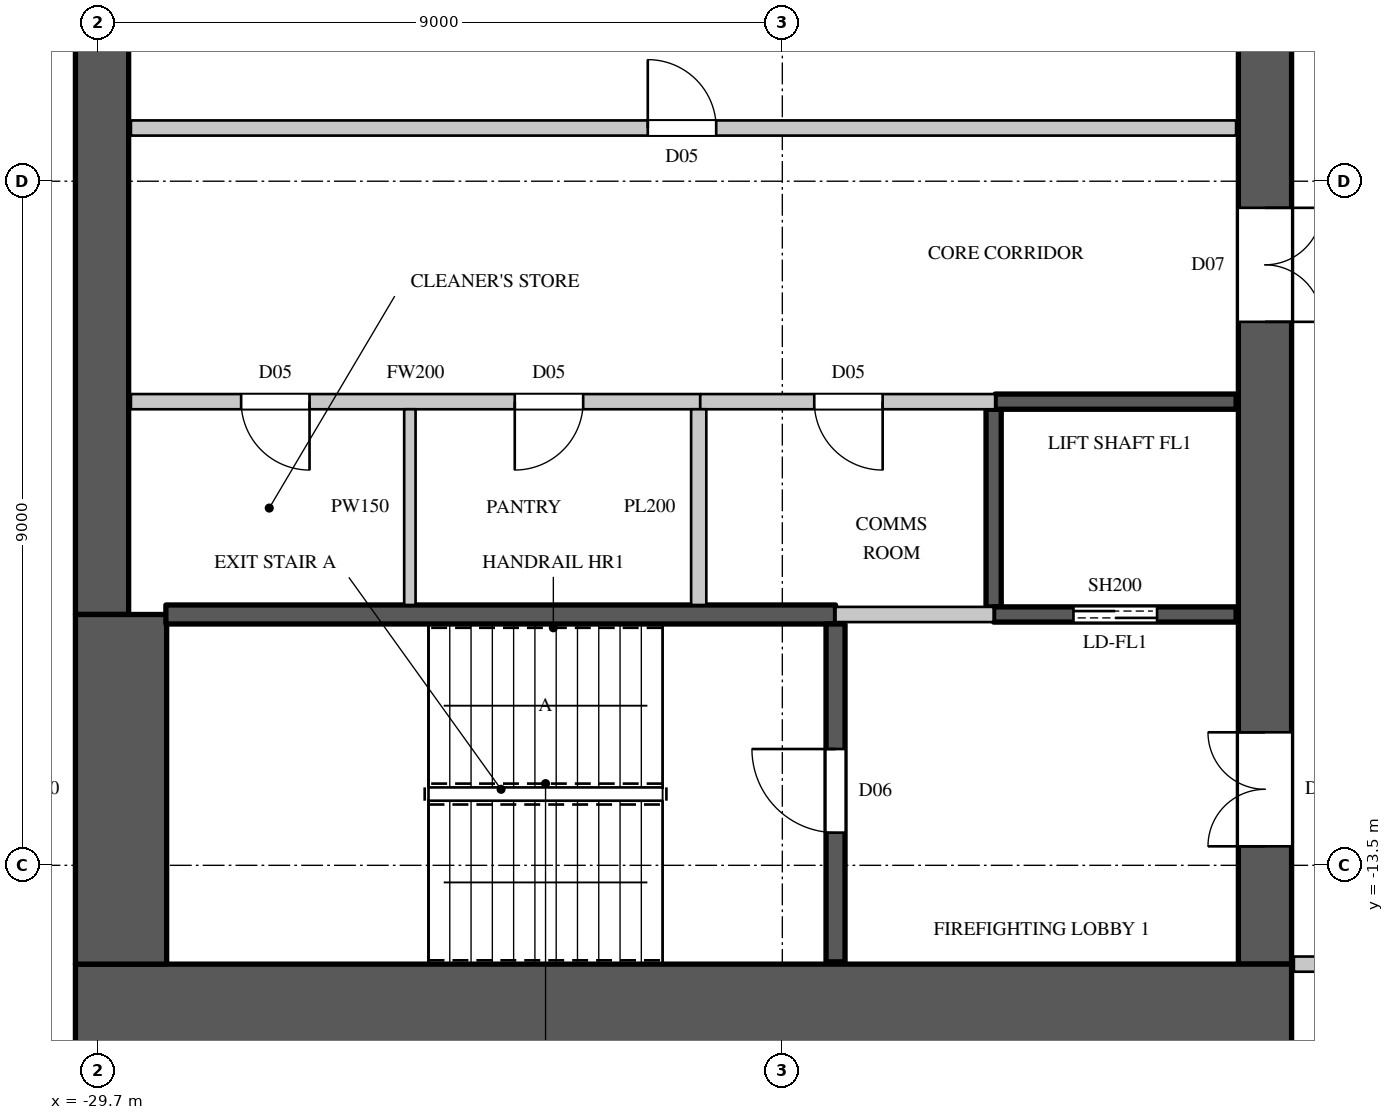
"""IFC4 building model, lengths in metres.
Left out: names, types, materials, properties, quantities, classifications, styles, units other than length and angle.
Written with IfcOpenShell. Run it as: python <this file> out.ifc"""

import sys

from ifc_helpers import new_model, si_unit, direction, frame, frame_2d, origin, place, context, subcontext, project, spatial, rectangle, extrude, element, fill, save


model = new_model("IFC4")
c1 = context("Model", 3, precision=1e-05, world=origin(), true_north=direction((0.0, 1.0)))
c2 = subcontext(c1, "Body", "Model", "MODEL_VIEW")
j1 = project(units=[si_unit("LENGTHUNIT", "METRE"), si_unit("PLANEANGLEUNIT", "RADIAN")], contexts=[c1])
p1 = place(None, origin())
s1 = spatial("IfcSite", under=j1, at=p1, CompositionType="ELEMENT")
p2 = place(p1, origin())
s2 = spatial("IfcBuilding", under=s1, at=p2, CompositionType="ELEMENT")
p3 = place(p2, frame((0.0, 0.0, 313.1)))
s3 = spatial("IfcBuildingStorey", under=s2, at=p3, CompositionType="ELEMENT", Elevation=313.1)
p4 = place(p3, frame((-30.0, -15.4, 0.0), z_axis=(0.0, 0.0, 1.0), x_axis=(1.0, 0.0, 0.0)))
e1 = element("IfcWall", 1, at=p4, inside=s3, PredefinedType="SHEAR", context=c2, shape_type="SweptSolid", body=[
    extrude(rectangle(XDim=16.0, YDim=1.2, at=frame_2d((8.0, 0.0))), origin(), (0.0, 0.0, 1.0), 4.1),
])
p5 = place(p3, frame((-14.35, -14.8, 0.0), z_axis=(0.0, 0.0, 1.0), x_axis=(0.0, 1.0, 0.0)))
e2 = element("IfcWall", 2, at=p5, inside=s3, PredefinedType="SHEAR", context=c2, shape_type="SweptSolid", body=[
    extrude(rectangle(XDim=29.6, YDim=0.7, at=frame_2d((14.8, 0.0))), origin(), (0.0, 0.0, 1.0), 4.1),
])
p6 = place(p5, frame((1.55, 0.0, 0.0)))
e3 = element("IfcOpeningElement", 3, at=p6, cuts=e2, PredefinedType="OPENING", context=c2, shape_type="SweptSolid", body=[
    extrude(rectangle(XDim=1.5, YDim=2.4, at=frame_2d((0.75, 1.2))), frame((0.0, 0.36, 0.0), z_axis=(0.0, -1.0, 0.0), x_axis=(1.0, 0.0, 0.0)), (0.0, 0.0, 1.0), 0.72),
])
p7 = place(p5, frame((26.55, 0.0, 0.0)))
e4 = element("IfcOpeningElement", 4, at=p7, cuts=e2, PredefinedType="OPENING", context=c2, shape_type="SweptSolid", body=[
    extrude(rectangle(XDim=1.5, YDim=2.4, at=frame_2d((0.75, 1.2))), frame((0.0, 0.36, 0.0), z_axis=(0.0, -1.0, 0.0), x_axis=(1.0, 0.0, 0.0)), (0.0, 0.0, 1.0), 0.72),
])
p8 = place(p5, frame((8.45, 0.0, 0.0)))
e5 = element("IfcOpeningElement", 5, at=p8, cuts=e2, PredefinedType="OPENING", context=c2, shape_type="SweptSolid", body=[
    extrude(rectangle(XDim=1.5, YDim=2.4, at=frame_2d((0.75, 1.2))), frame((0.0, 0.36, 0.0), z_axis=(0.0, -1.0, 0.0), x_axis=(1.0, 0.0, 0.0)), (0.0, 0.0, 1.0), 0.72),
])
p9 = place(p5, frame((19.65, 0.0, 0.0)))
e6 = element("IfcOpeningElement", 6, at=p9, cuts=e2, PredefinedType="OPENING", context=c2, shape_type="SweptSolid", body=[
    extrude(rectangle(XDim=1.5, YDim=2.4, at=frame_2d((0.75, 1.2))), frame((0.0, 0.36, 0.0), z_axis=(0.0, -1.0, 0.0), x_axis=(1.0, 0.0, 0.0)), (0.0, 0.0, 1.0), 0.72),
])
p10 = place(p5, frame((14.5, 0.0, 0.0)))
e7 = element("IfcOpeningElement", 7, at=p10, cuts=e2, PredefinedType="OPENING", context=c2, shape_type="SweptSolid", body=[
    extrude(rectangle(XDim=0.6, YDim=2.0, at=frame_2d((0.3, 1.0))), frame((0.0, 0.36, 0.0), z_axis=(0.0, -1.0, 0.0), x_axis=(1.0, 0.0, 0.0)), (0.0, 0.0, 1.0), 0.72),
])
p11 = place(p3, frame((-29.65, -10.2, 0.0), z_axis=(0.0, 0.0, 1.0), x_axis=(0.0, 1.0, 0.0)))
e8 = element("IfcWall", 8, at=p11, inside=s3, PredefinedType="SHEAR", context=c2, shape_type="SweptSolid", body=[
    extrude(rectangle(XDim=20.4, YDim=0.7, at=frame_2d((10.2, 0.0))), origin(), (0.0, 0.0, 1.0), 4.1),
])
p12 = place(p3, frame((-29.4, -14.8, 0.0), z_axis=(0.0, 0.0, 1.0), x_axis=(0.0, 1.0, 0.0)))
e9 = element("IfcWall", 9, at=p12, inside=s3, PredefinedType="SHEAR", context=c2, shape_type="SweptSolid", body=[
    extrude(rectangle(XDim=4.6, YDim=1.2, at=frame_2d((2.3, 0.0))), origin(), (0.0, 0.0, 1.0), 4.1),
])
p13 = place(p3, frame((-29.27, -7.4, 0.0), z_axis=(0.0, 0.0, 1.0), x_axis=(1.0, 0.0, 0.0)))
e10 = element("IfcWall", 10, at=p13, inside=s3, PredefinedType="PARTITIONING", context=c2, shape_type="SweptSolid", body=[
    extrude(rectangle(XDim=7.49, YDim=0.2, at=frame_2d((3.745, 0.0))), origin(), (0.0, 0.0, 1.0), 3.8),
])
p14 = place(p13, frame((1.45, 0.0, 0.0)))
e11 = element("IfcOpeningElement", 11, at=p14, cuts=e10, PredefinedType="OPENING", context=c2, shape_type="SweptSolid", body=[
    extrude(rectangle(XDim=0.9, YDim=2.2, at=frame_2d((0.45, 1.1))), frame((0.0, 0.11, 0.0), z_axis=(0.0, -1.0, 0.0), x_axis=(1.0, 0.0, 0.0)), (0.0, 0.0, 1.0), 0.22),
])
p15 = place(p13, frame((5.05, 0.0, 0.0)))
e12 = element("IfcOpeningElement", 12, at=p15, cuts=e10, PredefinedType="OPENING", context=c2, shape_type="SweptSolid", body=[
    extrude(rectangle(XDim=0.9, YDim=2.2, at=frame_2d((0.45, 1.1))), frame((0.0, 0.11, 0.0), z_axis=(0.0, -1.0, 0.0), x_axis=(1.0, 0.0, 0.0)), (0.0, 0.0, 1.0), 0.22),
])
p16 = place(p3, frame((-29.27, -3.8, 0.0), z_axis=(0.0, 0.0, 1.0), x_axis=(1.0, 0.0, 0.0)))
e13 = element("IfcWall", 13, at=p16, inside=s3, PredefinedType="PARTITIONING", context=c2, shape_type="SweptSolid", body=[
    extrude(rectangle(XDim=14.54, YDim=0.2, at=frame_2d((7.27, 0.0))), origin(), (0.0, 0.0, 1.0), 3.8),
])
p17 = place(p16, frame((6.8, 0.0, 0.0)))
e14 = element("IfcOpeningElement", 14, at=p17, cuts=e13, PredefinedType="OPENING", context=c2, shape_type="SweptSolid", body=[
    extrude(rectangle(XDim=0.9, YDim=2.2, at=frame_2d((0.45, 1.1))), frame((0.0, 0.11, 0.0), z_axis=(0.0, -1.0, 0.0), x_axis=(1.0, 0.0, 0.0)), (0.0, 0.0, 1.0), 0.22),
])
p18 = place(p3, frame((-13.97, -14.8, 0.0), z_axis=(0.0, 0.0, 1.0), x_axis=(1.0, 0.0, 0.0)))
e15 = element("IfcWall", 15, at=p18, inside=s3, PredefinedType="PARTITIONING", context=c2, shape_type="SweptSolid", body=[
    extrude(rectangle(XDim=2.87, YDim=0.2, at=frame_2d((1.435, 0.0))), origin(), (0.0, 0.0, 1.0), 3.8),
])
p19 = place(p3, frame((-25.6, -10.075, 0.0), z_axis=(0.0, 0.0, 1.0), x_axis=(0.0, 1.0, 0.0)))
e16 = element("IfcWall", 16, at=p19, inside=s3, PredefinedType="PARTITIONING", context=c2, shape_type="SweptSolid", body=[
    extrude(rectangle(XDim=2.575, YDim=0.15, at=frame_2d((1.288, 0.0))), origin(), (0.0, 0.0, 1.0), 3.8),
])
p20 = place(p3, frame((-21.78, -7.4, 0.0), z_axis=(0.0, 0.0, 1.0), x_axis=(1.0, 0.0, 0.0)))
e17 = element("IfcWall", 17, at=p20, inside=s3, PredefinedType="PARTITIONING", context=c2, shape_type="SweptSolid", body=[
    extrude(rectangle(XDim=3.88, YDim=0.2, at=frame_2d((1.94, 0.0))), origin(), (0.0, 0.0, 1.0), 3.8),
])
p21 = place(p20, frame((1.5, 0.0, 0.0)))
e18 = element("IfcOpeningElement", 18, at=p21, cuts=e17, PredefinedType="OPENING", context=c2, shape_type="SweptSolid", body=[
    extrude(rectangle(XDim=0.9, YDim=2.2, at=frame_2d((0.45, 1.1))), frame((0.0, 0.11, 0.0), z_axis=(0.0, -1.0, 0.0), x_axis=(1.0, 0.0, 0.0)), (0.0, 0.0, 1.0), 0.22),
])
p22 = place(p3, frame((-21.8, -10.075, 0.0), z_axis=(0.0, 0.0, 1.0), x_axis=(0.0, 1.0, 0.0)))
e19 = element("IfcWall", 19, at=p22, inside=s3, PredefinedType="PARTITIONING", context=c2, shape_type="SweptSolid", body=[
    extrude(rectangle(XDim=2.575, YDim=0.2, at=frame_2d((1.288, 0.0))), origin(), (0.0, 0.0, 1.0), 3.8),
])
p23 = place(p3, frame((-20.0, -10.2, 0.0), z_axis=(0.0, 0.0, 1.0), x_axis=(1.0, 0.0, 0.0)))
e20 = element("IfcWall", 20, at=p23, inside=s3, PredefinedType="PARTITIONING", context=c2, shape_type="SweptSolid", body=[
    extrude(rectangle(XDim=2.08, YDim=0.2, at=frame_2d((1.04, 0.0))), origin(), (0.0, 0.0, 1.0), 3.8),
])
p24 = place(p3, frame((-17.92, -10.1, 0.0), z_axis=(0.0, 0.0, 1.0), x_axis=(0.0, 1.0, 0.0)))
e21 = element("IfcWall", 21, at=p24, inside=s3, PredefinedType="SHEAR", context=c2, shape_type="SweptSolid", body=[
    extrude(rectangle(XDim=2.6, YDim=0.2, at=frame_2d((1.3, 0.0))), origin(), (0.0, 0.0, 1.0), 3.8),
])
p25 = place(p3, frame((-17.92, -10.2, 0.0), z_axis=(0.0, 0.0, 1.0), x_axis=(1.0, 0.0, 0.0)))
e22 = element("IfcWall", 22, at=p25, inside=s3, PredefinedType="SHEAR", context=c2, shape_type="SweptSolid", body=[
    extrude(rectangle(XDim=3.19, YDim=0.2, at=frame_2d((1.595, 0.0))), origin(), (0.0, 0.0, 1.0), 3.8),
])
p26 = place(p25, frame((1.05, 0.0, 0.0)))
e23 = element("IfcOpeningElement", 23, at=p26, cuts=e22, PredefinedType="OPENING", context=c2, shape_type="SweptSolid", body=[
    extrude(rectangle(XDim=1.1, YDim=2.2, at=frame_2d((0.55, 1.1))), frame((0.0, 0.11, 0.0), z_axis=(0.0, -1.0, 0.0), x_axis=(1.0, 0.0, 0.0)), (0.0, 0.0, 1.0), 0.22),
])
p27 = place(p3, frame((-17.9, -7.4, 0.0), z_axis=(0.0, 0.0, 1.0), x_axis=(1.0, 0.0, 0.0)))
e24 = element("IfcWall", 24, at=p27, inside=s3, PredefinedType="SHEAR", context=c2, shape_type="SweptSolid", body=[
    extrude(rectangle(XDim=3.17, YDim=0.2, at=frame_2d((1.585, 0.0))), origin(), (0.0, 0.0, 1.0), 3.8),
])
p28 = place(p3, frame((-28.81, -10.2, 0.0), z_axis=(0.0, 0.0, 1.0), x_axis=(1.0, 0.0, 0.0)))
e25 = element("IfcWall", 25, at=p28, inside=s3, PredefinedType="SHEAR", context=c2, shape_type="SweptSolid", body=[
    extrude(rectangle(XDim=8.81, YDim=0.25, at=frame_2d((4.405, 0.0))), origin(), (0.0, 0.0, 1.0), 3.8),
])
p29 = place(p3, frame((-20.0, -14.77, 0.0), z_axis=(0.0, 0.0, 1.0), x_axis=(0.0, 1.0, 0.0)))
e26 = element("IfcWall", 26, at=p29, inside=s3, PredefinedType="SHEAR", context=c2, shape_type="SweptSolid", body=[
    extrude(rectangle(XDim=4.445, YDim=0.25, at=frame_2d((2.223, 0.0))), origin(), (0.0, 0.0, 1.0), 3.8),
])
p30 = place(p29, frame((1.7, 0.0, 0.0)))
e27 = element("IfcOpeningElement", 27, at=p30, cuts=e26, PredefinedType="OPENING", context=c2, shape_type="SweptSolid", body=[
    extrude(rectangle(XDim=1.1, YDim=2.2, at=frame_2d((0.55, 1.1))), frame((0.0, 0.135, 0.0), z_axis=(0.0, -1.0, 0.0), x_axis=(1.0, 0.0, 0.0)), (0.0, 0.0, 1.0), 0.27),
])
p31 = place(p30, origin())
e28 = element("IfcDoor", 28, at=p31, inside=s3, OperationType="SINGLE_SWING_RIGHT", PredefinedType="DOOR", context=c2, shape_type="SweptSolid", body=[
    extrude(rectangle(XDim=1.1, YDim=2.2, at=frame_2d((0.55, 1.1))), frame((0.0, 0.025, 0.0), z_axis=(0.0, -1.0, 0.0), x_axis=(1.0, 0.0, 0.0)), (0.0, 0.0, 1.0), 0.05),
])
fill(e27, e28)
p32 = place(p14, origin())
e29 = element("IfcDoor", 29, at=p32, inside=s3, OperationType="SINGLE_SWING_LEFT", PredefinedType="DOOR", context=c2, shape_type="SweptSolid", body=[
    extrude(rectangle(XDim=0.9, YDim=2.2, at=frame_2d((0.45, 1.1))), frame((0.0, 0.025, 0.0), z_axis=(0.0, -1.0, 0.0), x_axis=(1.0, 0.0, 0.0)), (0.0, 0.0, 1.0), 0.05),
])
fill(e11, e29)
p33 = place(p15, origin())
e30 = element("IfcDoor", 30, at=p33, inside=s3, OperationType="SINGLE_SWING_RIGHT", PredefinedType="DOOR", context=c2, shape_type="SweptSolid", body=[
    extrude(rectangle(XDim=0.9, YDim=2.2, at=frame_2d((0.45, 1.1))), frame((0.0, 0.025, 0.0), z_axis=(0.0, -1.0, 0.0), x_axis=(1.0, 0.0, 0.0)), (0.0, 0.0, 1.0), 0.05),
])
fill(e12, e30)
p34 = place(p21, origin())
e31 = element("IfcDoor", 31, at=p34, inside=s3, OperationType="SINGLE_SWING_LEFT", PredefinedType="DOOR", context=c2, shape_type="SweptSolid", body=[
    extrude(rectangle(XDim=0.9, YDim=2.2, at=frame_2d((0.45, 1.1))), frame((0.0, 0.025, 0.0), z_axis=(0.0, -1.0, 0.0), x_axis=(1.0, 0.0, 0.0)), (0.0, 0.0, 1.0), 0.05),
])
fill(e18, e31)
p35 = place(p17, origin())
e32 = element("IfcDoor", 32, at=p35, inside=s3, OperationType="SINGLE_SWING_LEFT", PredefinedType="DOOR", context=c2, shape_type="SweptSolid", body=[
    extrude(rectangle(XDim=0.9, YDim=2.2, at=frame_2d((0.45, 1.1))), frame((0.0, 0.025, 0.0), z_axis=(0.0, -1.0, 0.0), x_axis=(1.0, 0.0, 0.0)), (0.0, 0.0, 1.0), 0.05),
])
fill(e14, e32)
p36 = place(p26, origin())
e33 = element("IfcDoor", 33, at=p36, inside=s3, OperationType="DOUBLE_DOOR_SLIDING", PredefinedType="DOOR", context=c2, shape_type="SweptSolid", body=[
    extrude(rectangle(XDim=1.1, YDim=2.2, at=frame_2d((0.55, 1.1))), frame((0.0, 0.025, 0.0), z_axis=(0.0, -1.0, 0.0), x_axis=(1.0, 0.0, 0.0)), (0.0, 0.0, 1.0), 0.05),
])
fill(e23, e33)
p37 = place(p6, origin())
e34 = element("IfcDoor", 34, at=p37, inside=s3, OperationType="DOUBLE_DOOR_SINGLE_SWING", PredefinedType="DOOR", context=c2, shape_type="SweptSolid", body=[
    extrude(rectangle(XDim=1.5, YDim=2.4, at=frame_2d((0.75, 1.2))), frame((0.0, 0.345, 0.0), z_axis=(0.0, -1.0, 0.0), x_axis=(1.0, 0.0, 0.0)), (0.0, 0.0, 1.0), 0.05),
])
fill(e3, e34)
p38 = place(p8, origin())
e35 = element("IfcDoor", 35, at=p38, inside=s3, OperationType="DOUBLE_DOOR_SINGLE_SWING", PredefinedType="DOOR", context=c2, shape_type="SweptSolid", body=[
    extrude(rectangle(XDim=1.5, YDim=2.4, at=frame_2d((0.75, 1.2))), frame((0.0, -0.295, 0.0), z_axis=(0.0, -1.0, 0.0), x_axis=(1.0, 0.0, 0.0)), (0.0, 0.0, 1.0), 0.05),
])
fill(e5, e35)
save(model, sys.argv[1])
